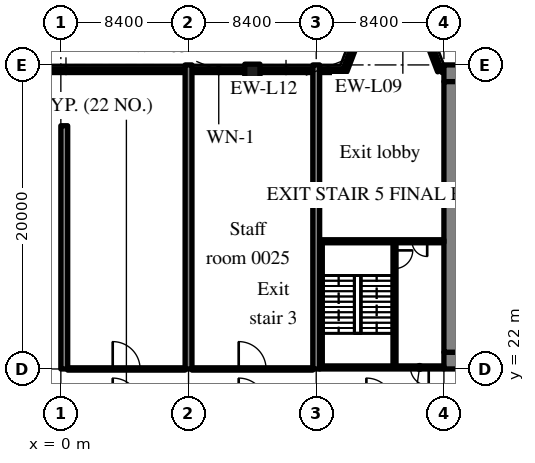
"""IFC4 building model, lengths in metres.
Left out: names, types, materials, properties, quantities, classifications, styles, units other than length and angle.
Written with IfcOpenShell. Run it as: python <this file> out.ifc"""

import sys

from ifc_helpers import new_model, si_unit, direction, frame, frame_2d, origin, origin_2d, place, context, subcontext, project, spatial, rectangle, extrude, source, transform, mapped, element, fill, save


model = new_model("IFC4")
c1 = context("Model", 3, precision=1e-05, world=origin(), true_north=direction((0.0, 1.0)))
c2 = subcontext(c1, "Body", "Model", "MODEL_VIEW")
j1 = project(units=[si_unit("LENGTHUNIT", "METRE"), si_unit("PLANEANGLEUNIT", "RADIAN")], contexts=[c1])
p1 = place(None, origin())
s1 = spatial("IfcSite", under=j1, at=p1, CompositionType="ELEMENT")
p2 = place(p1, origin())
s2 = spatial("IfcBuilding", under=s1, at=p2, CompositionType="ELEMENT")
p3 = place(p2, origin())
s3 = spatial("IfcBuildingStorey", under=s2, at=p3, CompositionType="ELEMENT", Elevation=0.0)
m1 = source(origin(), c2, "Body", "SweptSolid", [
    extrude(rectangle(XDim=50.4, YDim=1.1, at=frame_2d((25.2, 0.0))), origin(), (0.0, 0.0, 1.0), 5.72),
])
p4 = place(p3, frame((25.2, 22.55, 0.0), z_axis=(0.0, 0.0, 1.0), x_axis=(1.0, 0.0, 0.0)))
e1 = element("IfcWall", 1, at=p4, inside=s3, PredefinedType="SHEAR", context=c2, shape_type="MappedRepresentation", body=[
    mapped(m1, transform((0.0, 0.0, 0.0), scale=1.0)),
])
m2 = source(origin(), c2, "Body", "SweptSolid", [
    extrude(rectangle(XDim=1.8, YDim=2.1, at=frame_2d((0.9, 1.05))), frame((0.0, 0.56, 0.0), z_axis=(0.0, -1.0, 0.0), x_axis=(1.0, 0.0, 0.0)), (0.0, 0.0, 1.0), 1.12),
])
p5 = place(p4, frame((15.9, 0.0, 0.0)))
e2 = element("IfcOpeningElement", 2, at=p5, cuts=e1, PredefinedType="OPENING", context=c2, shape_type="MappedRepresentation", body=[
    mapped(m2, transform((0.0, 0.0, 0.0), scale=1.0)),
])
p6 = place(p4, frame((32.7, 0.0, 0.0)))
e3 = element("IfcOpeningElement", 3, at=p6, cuts=e1, PredefinedType="OPENING", context=c2, shape_type="MappedRepresentation", body=[
    mapped(m2, transform((0.0, 0.0, 0.0), scale=1.0)),
])
m3 = source(origin(), c2, "Body", "SweptSolid", [
    extrude(rectangle(XDim=0.9, YDim=2.1, at=frame_2d((0.45, 1.05))), frame((0.0, 0.56, 0.0), z_axis=(0.0, -1.0, 0.0), x_axis=(1.0, 0.0, 0.0)), (0.0, 0.0, 1.0), 1.12),
])
p7 = place(p4, frame((39.75, 0.0, 0.0)))
e4 = element("IfcOpeningElement", 4, at=p7, cuts=e1, PredefinedType="OPENING", context=c2, shape_type="MappedRepresentation", body=[
    mapped(m3, transform((0.0, 0.0, 0.0), scale=1.0)),
])
p8 = place(p4, frame((28.05, 0.0, 0.0)))
e5 = element("IfcOpeningElement", 5, at=p8, cuts=e1, PredefinedType="OPENING", context=c2, shape_type="MappedRepresentation", body=[
    mapped(m3, transform((0.0, 0.0, 0.0), scale=1.0)),
])
m4 = source(origin(), c2, "Body", "SweptSolid", [
    extrude(rectangle(XDim=1.2, YDim=2.1, at=frame_2d((0.6, 1.05))), frame((0.0, 0.56, 0.0), z_axis=(0.0, -1.0, 0.0), x_axis=(1.0, 0.0, 0.0)), (0.0, 0.0, 1.0), 1.12),
])
p9 = place(p4, frame((6.425, 0.0, 0.0)))
e6 = element("IfcOpeningElement", 6, at=p9, cuts=e1, PredefinedType="OPENING", context=c2, shape_type="MappedRepresentation", body=[
    mapped(m4, transform((0.0, 0.0, 0.0), scale=1.0)),
])
p10 = place(p4, frame((47.675, 0.0, 0.0)))
e7 = element("IfcOpeningElement", 7, at=p10, cuts=e1, PredefinedType="OPENING", context=c2, shape_type="MappedRepresentation", body=[
    mapped(m4, transform((0.0, 0.0, 0.0), scale=1.0)),
])
p11 = place(p3, frame((25.2, 41.45, 0.0), z_axis=(0.0, 0.0, 1.0), x_axis=(1.0, 0.0, 0.0)))
e8 = element("IfcWall", 8, at=p11, inside=s3, PredefinedType="SHEAR", context=c2, shape_type="MappedRepresentation", body=[
    mapped(m1, transform((0.0, 0.0, 0.0), scale=1.0)),
])
p12 = place(p11, frame((6.375, 0.0, 0.0)))
e9 = element("IfcOpeningElement", 9, at=p12, cuts=e8, PredefinedType="OPENING", context=c2, shape_type="MappedRepresentation", body=[
    mapped(m4, transform((0.0, 0.0, 0.0), scale=1.0)),
])
p13 = place(p11, frame((47.625, 0.0, 0.0)))
e10 = element("IfcOpeningElement", 10, at=p13, cuts=e8, PredefinedType="OPENING", context=c2, shape_type="MappedRepresentation", body=[
    mapped(m4, transform((0.0, 0.0, 0.0), scale=1.0)),
])
m5 = source(origin(), c2, "Body", "SweptSolid", [
    extrude(rectangle(XDim=17.8, YDim=1.1, at=frame_2d((8.9, 0.0))), origin(), (0.0, 0.0, 1.0), 5.72),
])
p14 = place(p3, frame((25.75, 23.1, 0.0), z_axis=(0.0, 0.0, 1.0), x_axis=(0.0, 1.0, 0.0)))
e11 = element("IfcWall", 11, at=p14, inside=s3, PredefinedType="SHEAR", context=c2, shape_type="MappedRepresentation", body=[
    mapped(m5, transform((0.0, 0.0, 0.0), scale=1.0)),
])
m6 = source(origin(), c2, "Body", "SweptSolid", [
    extrude(rectangle(XDim=16.0, YDim=0.45, at=frame_2d((8.0, 0.0))), origin(), (0.0, 0.0, 1.0), 5.72),
])
p15 = place(p3, frame((0.225, 22.0, 0.0), z_axis=(0.0, 0.0, 1.0), x_axis=(0.0, 1.0, 0.0)))
e12 = element("IfcWall", 12, at=p15, inside=s3, PredefinedType="SHEAR", context=c2, shape_type="MappedRepresentation", body=[
    mapped(m6, transform((0.0, 0.0, 0.0), scale=1.0)),
])
m7 = source(origin(), c2, "Body", "SweptSolid", [
    extrude(rectangle(XDim=20.0, YDim=0.45, at=frame_2d((10.0, 0.0))), origin(), (0.0, 0.0, 1.0), 5.72),
])
for number, where, z_axis, x_axis in (
    (13, (8.4, 22.0, 0.0), (0.0, 0.0, 1.0), (0.0, 1.0, 0.0)),
    (14, (16.8, 22.0, 0.0), (0.0, 0.0, 1.0), (0.0, 1.0, 0.0)),
):
    element("IfcWall", number, at=place(p3, frame(where, z_axis=z_axis, x_axis=x_axis)), inside=s3, PredefinedType="SHEAR", context=c2, shape_type="MappedRepresentation", body=[
        mapped(m7, transform((0.0, 0.0, 0.0), scale=1.0)),
    ])
m8 = source(origin(), c2, "Body", "SweptSolid", [
    extrude(rectangle(XDim=1.0, YDim=1.0, at=origin_2d()), origin(), (0.0, 0.0, 1.0), 5.72),
])
p16 = place(p3, frame((12.6, 41.55, 0.0), z_axis=(0.0, 0.0, 1.0), x_axis=(1.0, 0.0, 0.0)))
e15 = element("IfcColumn", 15, at=p16, inside=s3, PredefinedType="COLUMN", context=c2, shape_type="MappedRepresentation", body=[
    mapped(m8, transform((0.0, 0.0, 0.0), scale=1.0)),
])
m9 = source(origin(), c2, "Body", "SweptSolid", [
    extrude(rectangle(XDim=0.138, YDim=0.25, at=frame_2d((0.069, 0.0))), origin(), (0.0, 0.0, 1.0), 4.97),
])
p17 = place(p3, frame((25.2, 41.625, 0.0), z_axis=(0.0, 0.0, 1.0), x_axis=(-1.0, 0.0, 0.0)))
e16 = element("IfcWall", 16, at=p17, inside=s3, PredefinedType="SOLIDWALL", context=c2, shape_type="MappedRepresentation", body=[
    mapped(m9, transform((0.0, 0.0, 0.0), scale=1.0)),
])
m10 = source(origin(), c2, "Body", "SweptSolid", [
    extrude(rectangle(XDim=1.812, YDim=0.3, at=frame_2d((0.906, 0.0))), origin(), (0.0, 0.0, 1.0), 5.72),
])
p18 = place(p3, frame((24.925, 41.6, 0.0), z_axis=(0.0, 0.0, 1.0), x_axis=(-0.357759776872, 0.933813654886, 0.0)))
e17 = element("IfcWall", 17, at=p18, inside=s3, PredefinedType="SOLIDWALL", context=c2, shape_type="MappedRepresentation", body=[
    mapped(m10, transform((0.0, 0.0, 0.0), scale=1.0)),
])
m11 = source(origin(), c2, "Body", "SweptSolid", [
    extrude(rectangle(XDim=1.812, YDim=0.3, at=frame_2d((0.906, 0.0))), origin(), (0.0, 0.0, 1.0), 5.72),
])
p19 = place(p3, frame((19.323, 43.292, 0.0), z_axis=(0.0, 0.0, 1.0), x_axis=(-0.357877270961, -0.93376863244, 0.0)))
e18 = element("IfcWall", 18, at=p19, inside=s3, PredefinedType="SOLIDWALL", context=c2, shape_type="MappedRepresentation", body=[
    mapped(m11, transform((0.0, 0.0, 0.0), scale=1.0)),
])
m12 = source(origin(), c2, "Body", "SweptSolid", [
    extrude(rectangle(XDim=1.513, YDim=0.25, at=frame_2d((0.756, 0.0))), origin(), (0.0, 0.0, 1.0), 4.97),
])
p20 = place(p3, frame((18.538, 41.625, 0.0), z_axis=(0.0, 0.0, 1.0), x_axis=(-1.0, 0.0, 0.0)))
e19 = element("IfcWall", 19, at=p20, inside=s3, PredefinedType="SOLIDWALL", context=c2, shape_type="MappedRepresentation", body=[
    mapped(m12, transform((0.0, 0.0, 0.0), scale=1.0)),
])
m13 = source(origin(), c2, "Body", "SweptSolid", [
    extrude(rectangle(XDim=3.525, YDim=0.25, at=frame_2d((1.762, 0.0))), origin(), (0.0, 0.0, 1.0), 4.97),
])
p21 = place(p3, frame((16.575, 41.625, 0.0), z_axis=(0.0, 0.0, 1.0), x_axis=(-1.0, 0.0, 0.0)))
e20 = element("IfcWall", 20, at=p21, inside=s3, PredefinedType="SOLIDWALL", context=c2, shape_type="MappedRepresentation", body=[
    mapped(m13, transform((0.0, 0.0, 0.0), scale=1.0)),
])
m14 = source(origin(), c2, "Body", "SweptSolid", [
    extrude(rectangle(XDim=1.5, YDim=1.5, at=frame_2d((0.75, 0.75))), frame((0.0, 0.135, 0.0), z_axis=(0.0, -1.0, 0.0), x_axis=(1.0, 0.0, 0.0)), (0.0, 0.0, 1.0), 0.27),
])
p22 = place(p21, frame((1.012, 0.0, 0.9)))
e21 = element("IfcOpeningElement", 21, at=p22, cuts=e20, PredefinedType="OPENING", context=c2, shape_type="MappedRepresentation", body=[
    mapped(m14, transform((0.0, 0.0, 0.0), scale=1.0)),
])
p23 = place(p3, frame((12.15, 41.625, 0.0), z_axis=(0.0, 0.0, 1.0), x_axis=(-1.0, 0.0, 0.0)))
e22 = element("IfcWall", 22, at=p23, inside=s3, PredefinedType="SOLIDWALL", context=c2, shape_type="MappedRepresentation", body=[
    mapped(m13, transform((0.0, 0.0, 0.0), scale=1.0)),
])
p24 = place(p23, frame((1.012, 0.0, 0.9)))
e23 = element("IfcOpeningElement", 23, at=p24, cuts=e22, PredefinedType="OPENING", context=c2, shape_type="MappedRepresentation", body=[
    mapped(m14, transform((0.0, 0.0, 0.0), scale=1.0)),
])
m15 = source(origin(), c2, "Body", "SweptSolid", [
    extrude(rectangle(XDim=15.675, YDim=0.25, at=frame_2d((7.837, 0.0))), origin(), (0.0, 0.0, 1.0), 4.97),
])
p25 = place(p3, frame((8.175, 41.625, 0.0), z_axis=(0.0, 0.0, 1.0), x_axis=(-1.0, 0.0, 0.0)))
e24 = element("IfcWall", 24, at=p25, inside=s3, PredefinedType="SOLIDWALL", context=c2, shape_type="MappedRepresentation", body=[
    mapped(m15, transform((0.0, 0.0, 0.0), scale=1.0)),
])
p26 = place(p25, frame((1.209, 0.0, 0.9)))
e25 = element("IfcOpeningElement", 25, at=p26, cuts=e24, PredefinedType="OPENING", context=c2, shape_type="MappedRepresentation", body=[
    mapped(m14, transform((0.0, 0.0, 0.0), scale=1.0)),
])
p27 = place(p25, frame((5.128, 0.0, 0.9)))
e26 = element("IfcOpeningElement", 26, at=p27, cuts=e24, PredefinedType="OPENING", context=c2, shape_type="MappedRepresentation", body=[
    mapped(m14, transform((0.0, 0.0, 0.0), scale=1.0)),
])
p28 = place(p25, frame((9.047, 0.0, 0.9)))
e27 = element("IfcOpeningElement", 27, at=p28, cuts=e24, PredefinedType="OPENING", context=c2, shape_type="MappedRepresentation", body=[
    mapped(m14, transform((0.0, 0.0, 0.0), scale=1.0)),
])
p29 = place(p25, frame((12.966, 0.0, 0.9)))
e28 = element("IfcOpeningElement", 28, at=p29, cuts=e24, PredefinedType="OPENING", context=c2, shape_type="MappedRepresentation", body=[
    mapped(m14, transform((0.0, 0.0, 0.0), scale=1.0)),
])
m16 = source(origin(), c2, "Body", "SweptSolid", [
    extrude(rectangle(XDim=8.3, YDim=0.2, at=frame_2d((4.15, 0.0))), origin(), (0.0, 0.0, 1.0), 5.72),
])
p30 = place(p3, frame((21.95, 22.1, 0.0), z_axis=(0.0, 0.0, 1.0), x_axis=(0.0, 1.0, 0.0)))
e29 = element("IfcWall", 29, at=p30, inside=s3, PredefinedType="SOLIDWALL", context=c2, shape_type="MappedRepresentation", body=[
    mapped(m16, transform((0.0, 0.0, 0.0), scale=1.0)),
])
m17 = source(origin(), c2, "Body", "SweptSolid", [
    extrude(rectangle(XDim=1.2, YDim=2.1, at=frame_2d((0.6, 1.05))), frame((0.0, 0.11, 0.0), z_axis=(0.0, -1.0, 0.0), x_axis=(1.0, 0.0, 0.0)), (0.0, 0.0, 1.0), 0.22),
])
p31 = place(p30, frame((6.5, 0.0, 0.0)))
e30 = element("IfcOpeningElement", 30, at=p31, cuts=e29, PredefinedType="OPENING", context=c2, shape_type="MappedRepresentation", body=[
    mapped(m17, transform((0.0, 0.0, 0.0), scale=1.0)),
])
m18 = source(origin(), c2, "Body", "SweptSolid", [
    extrude(rectangle(XDim=8.175, YDim=0.2, at=frame_2d((4.087, 0.0))), origin(), (0.0, 0.0, 1.0), 5.72),
])
p32 = place(p3, frame((17.025, 22.1, 0.0), z_axis=(0.0, 0.0, 1.0), x_axis=(1.0, 0.0, 0.0)))
e31 = element("IfcWall", 31, at=p32, inside=s3, PredefinedType="SOLIDWALL", context=c2, shape_type="MappedRepresentation", body=[
    mapped(m18, transform((0.0, 0.0, 0.0), scale=1.0)),
])
p33 = place(p32, frame((5.975, 0.0, 0.0)))
e32 = element("IfcOpeningElement", 32, at=p33, cuts=e31, PredefinedType="OPENING", context=c2, shape_type="MappedRepresentation", body=[
    mapped(m17, transform((0.0, 0.0, 0.0), scale=1.0)),
])
p34 = place(p3, frame((17.025, 30.4, 0.0), z_axis=(0.0, 0.0, 1.0), x_axis=(1.0, 0.0, 0.0)))
e33 = element("IfcWall", 33, at=p34, inside=s3, PredefinedType="SOLIDWALL", context=c2, shape_type="MappedRepresentation", body=[
    mapped(m18, transform((0.0, 0.0, 0.0), scale=1.0)),
])
m19 = source(origin(), c2, "Body", "SweptSolid", [
    extrude(rectangle(XDim=1.0, YDim=2.1, at=frame_2d((0.5, 1.05))), frame((0.0, 0.11, 0.0), z_axis=(0.0, -1.0, 0.0), x_axis=(1.0, 0.0, 0.0)), (0.0, 0.0, 1.0), 0.22),
])
p35 = place(p34, frame((6.075, 0.0, 0.0)))
e34 = element("IfcOpeningElement", 34, at=p35, cuts=e33, PredefinedType="OPENING", context=c2, shape_type="MappedRepresentation", body=[
    mapped(m19, transform((0.0, 0.0, 0.0), scale=1.0)),
])
m20 = source(origin(), c2, "Body", "SweptSolid", [
    extrude(rectangle(XDim=8.1, YDim=0.175, at=frame_2d((4.05, 0.0))), origin(), (0.0, 0.0, 1.0), 5.72),
])
p36 = place(p3, frame((17.112, 22.2, 0.0), z_axis=(0.0, 0.0, 1.0), x_axis=(0.0, 1.0, 0.0)))
e35 = element("IfcWall", 35, at=p36, inside=s3, PredefinedType="SOLIDWALL", context=c2, shape_type="MappedRepresentation", body=[
    mapped(m20, transform((0.0, 0.0, 0.0), scale=1.0)),
])
m21 = source(origin(), c2, "Body", "SweptSolid", [
    extrude(rectangle(XDim=7.725, YDim=0.15, at=frame_2d((3.863, 0.0))), origin(), (0.0, 0.0, 1.0), 5.02),
])
p37 = place(p3, frame((0.45, 22.0, 0.0), z_axis=(0.0, 0.0, 1.0), x_axis=(1.0, 0.0, 0.0)))
e36 = element("IfcWall", 36, at=p37, inside=s3, PredefinedType="PARTITIONING", context=c2, shape_type="MappedRepresentation", body=[
    mapped(m21, transform((0.0, 0.0, 0.0), scale=1.0)),
])
m22 = source(origin(), c2, "Body", "SweptSolid", [
    extrude(rectangle(XDim=1.8, YDim=2.1, at=frame_2d((0.9, 1.05))), frame((0.0, 0.085, 0.0), z_axis=(0.0, -1.0, 0.0), x_axis=(1.0, 0.0, 0.0)), (0.0, 0.0, 1.0), 0.17),
])
p38 = place(p37, frame((2.962, 0.0, 0.0)))
e37 = element("IfcOpeningElement", 37, at=p38, cuts=e36, PredefinedType="OPENING", context=c2, shape_type="MappedRepresentation", body=[
    mapped(m22, transform((0.0, 0.0, 0.0), scale=1.0)),
])
m23 = source(origin(), c2, "Body", "SweptSolid", [
    extrude(rectangle(XDim=7.95, YDim=0.15, at=frame_2d((3.975, 0.0))), origin(), (0.0, 0.0, 1.0), 5.02),
])
p39 = place(p3, frame((8.625, 22.0, 0.0), z_axis=(0.0, 0.0, 1.0), x_axis=(1.0, 0.0, 0.0)))
e38 = element("IfcWall", 38, at=p39, inside=s3, PredefinedType="PARTITIONING", context=c2, shape_type="MappedRepresentation", body=[
    mapped(m23, transform((0.0, 0.0, 0.0), scale=1.0)),
])
p40 = place(p39, frame((3.075, 0.0, 0.0)))
e39 = element("IfcOpeningElement", 39, at=p40, cuts=e38, PredefinedType="OPENING", context=c2, shape_type="MappedRepresentation", body=[
    mapped(m22, transform((0.0, 0.0, 0.0), scale=1.0)),
])
m24 = source(origin(), c2, "Body", "SweptSolid", [
    extrude(rectangle(XDim=1.5, YDim=1.5, at=frame_2d((0.75, 0.75))), frame((0.0, 0.03, 0.0), z_axis=(0.0, -1.0, 0.0), x_axis=(1.0, 0.0, 0.0)), (0.0, 0.0, 1.0), 0.06),
])
p41 = place(p22, origin())
e40 = element("IfcWindow", 40, at=p41, inside=s3, PartitioningType="SINGLE_PANEL", PredefinedType="WINDOW", context=c2, shape_type="MappedRepresentation", body=[
    mapped(m24, transform((0.0, 0.0, 0.0), scale=1.0)),
])
fill(e21, e40)
p42 = place(p24, origin())
e41 = element("IfcWindow", 41, at=p42, inside=s3, PartitioningType="SINGLE_PANEL", PredefinedType="WINDOW", context=c2, shape_type="MappedRepresentation", body=[
    mapped(m24, transform((0.0, 0.0, 0.0), scale=1.0)),
])
fill(e23, e41)
p43 = place(p26, origin())
e42 = element("IfcWindow", 42, at=p43, inside=s3, PartitioningType="SINGLE_PANEL", PredefinedType="WINDOW", context=c2, shape_type="MappedRepresentation", body=[
    mapped(m24, transform((0.0, 0.0, 0.0), scale=1.0)),
])
fill(e25, e42)
p44 = place(p27, origin())
e43 = element("IfcWindow", 43, at=p44, inside=s3, PartitioningType="SINGLE_PANEL", PredefinedType="WINDOW", context=c2, shape_type="MappedRepresentation", body=[
    mapped(m24, transform((0.0, 0.0, 0.0), scale=1.0)),
])
fill(e26, e43)
m25 = source(origin(), c2, "Body", "SweptSolid", [
    extrude(rectangle(XDim=1.2, YDim=2.1, at=frame_2d((0.6, 1.05))), frame((0.0, 0.025, 0.0), z_axis=(0.0, -1.0, 0.0), x_axis=(1.0, 0.0, 0.0)), (0.0, 0.0, 1.0), 0.05),
])
p45 = place(p31, origin())
e44 = element("IfcDoor", 44, at=p45, inside=s3, OperationType="SINGLE_SWING_RIGHT", PredefinedType="DOOR", context=c2, shape_type="MappedRepresentation", body=[
    mapped(m25, transform((0.0, 0.0, 0.0), scale=1.0)),
])
fill(e30, e44)
p46 = place(p33, origin())
e45 = element("IfcDoor", 45, at=p46, inside=s3, OperationType="SINGLE_SWING_RIGHT", PredefinedType="DOOR", context=c2, shape_type="MappedRepresentation", body=[
    mapped(m25, transform((0.0, 0.0, 0.0), scale=1.0)),
])
fill(e32, e45)
m26 = source(origin(), c2, "Body", "SweptSolid", [
    extrude(rectangle(XDim=1.0, YDim=2.1, at=frame_2d((0.5, 1.05))), frame((0.0, 0.025, 0.0), z_axis=(0.0, -1.0, 0.0), x_axis=(1.0, 0.0, 0.0)), (0.0, 0.0, 1.0), 0.05),
])
p47 = place(p35, origin())
e46 = element("IfcDoor", 46, at=p47, inside=s3, OperationType="SINGLE_SWING_RIGHT", PredefinedType="DOOR", context=c2, shape_type="MappedRepresentation", body=[
    mapped(m26, transform((0.0, 0.0, 0.0), scale=1.0)),
])
fill(e34, e46)
m27 = source(origin(), c2, "Body", "SweptSolid", [
    extrude(rectangle(XDim=1.8, YDim=2.1, at=frame_2d((0.9, 1.05))), frame((0.0, 0.025, 0.0), z_axis=(0.0, -1.0, 0.0), x_axis=(1.0, 0.0, 0.0)), (0.0, 0.0, 1.0), 0.05),
])
p48 = place(p38, origin())
e47 = element("IfcDoor", 47, at=p48, inside=s3, OperationType="DOUBLE_DOOR_SINGLE_SWING", PredefinedType="DOOR", context=c2, shape_type="MappedRepresentation", body=[
    mapped(m27, transform((0.0, 0.0, 0.0), scale=1.0)),
])
fill(e37, e47)
p49 = place(p40, origin())
e48 = element("IfcDoor", 48, at=p49, inside=s3, OperationType="DOUBLE_DOOR_SINGLE_SWING", PredefinedType="DOOR", context=c2, shape_type="MappedRepresentation", body=[
    mapped(m27, transform((0.0, 0.0, 0.0), scale=1.0)),
])
fill(e39, e48)
save(model, sys.argv[1])
